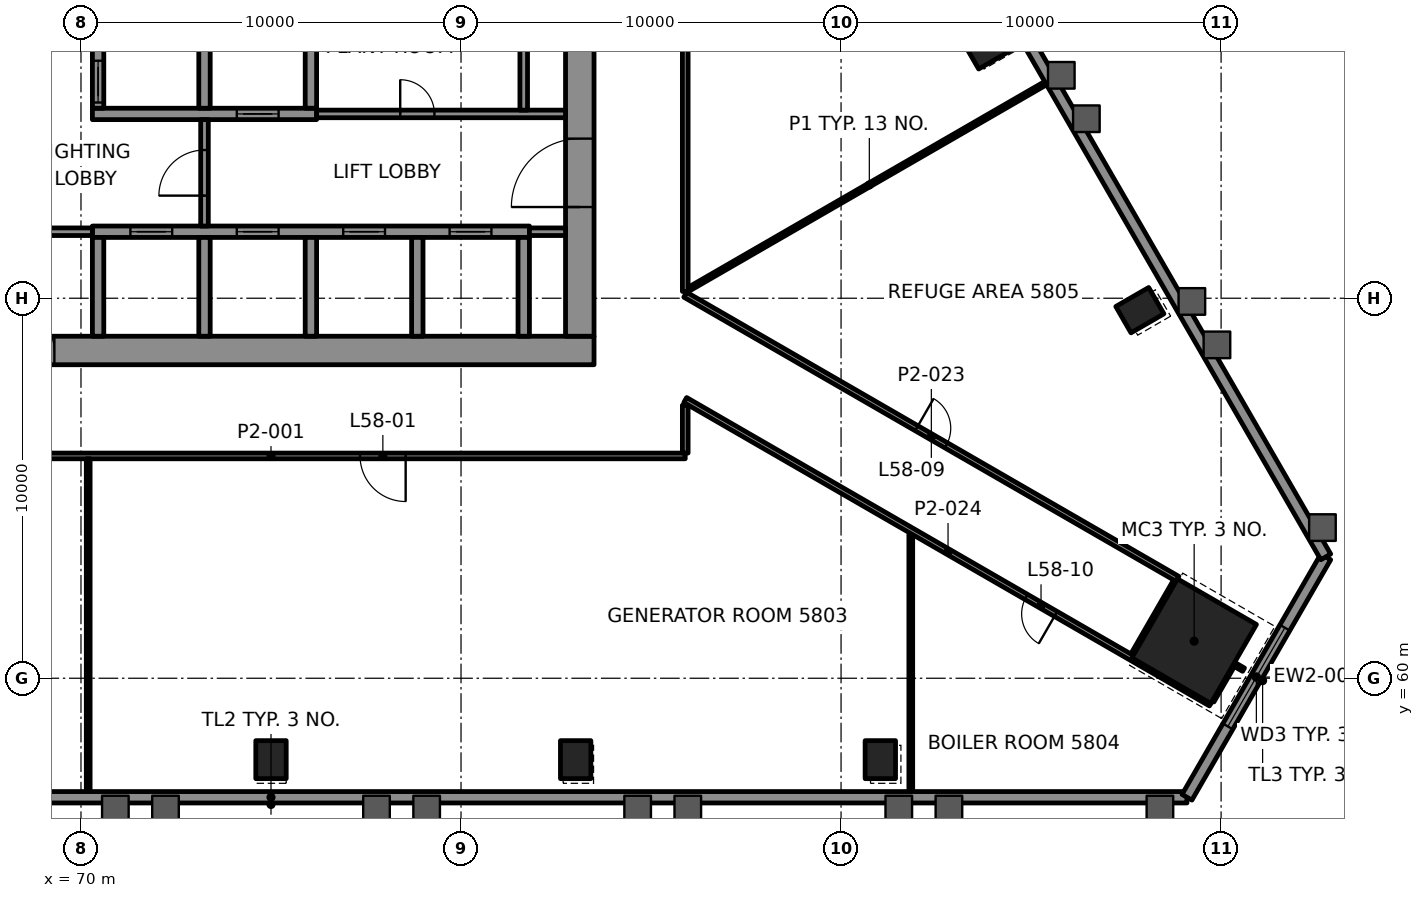
"""IFC4 building model, lengths in metres.
Left out: names, types, materials, properties, quantities, classifications, styles, units other than length and angle.
Written with IfcOpenShell. Run it as: python <this file> out.ifc"""

import sys

from ifc_helpers import new_model, si_unit, direction, frame, frame_2d, origin, origin_2d, place, context, subcontext, project, spatial, rectangle, hollow_rectangle, extrude, element, fill, save


model = new_model("IFC4")
c1 = context("Model", 3, precision=1e-05, world=origin(), true_north=direction((0.0, 1.0)))
c2 = subcontext(c1, "Body", "Model", "MODEL_VIEW")
j1 = project(units=[si_unit("LENGTHUNIT", "METRE"), si_unit("PLANEANGLEUNIT", "RADIAN")], contexts=[c1])
p1 = place(None, origin())
s1 = spatial("IfcSite", under=j1, at=p1, CompositionType="ELEMENT")
p2 = place(p1, origin())
s2 = spatial("IfcBuilding", under=s1, at=p2, CompositionType="ELEMENT")
p3 = place(p2, frame((0.0, 0.0, 247.6)))
s3 = spatial("IfcBuildingStorey", under=s2, at=p3, CompositionType="ELEMENT", Elevation=247.6)
p4 = place(p3, frame((99.291, 60.976, 0.0), z_axis=(0.0, 0.0, 1.0), x_axis=(0.5, 0.866025403784, 0.0)))
e1 = element("IfcColumn", 1, at=p4, inside=s3, PredefinedType="COLUMN", context=c2, shape_type="SweptSolid", body=[
    extrude(rectangle(XDim=2.4, YDim=2.4, at=origin_2d()), origin(), (0.0, 0.0, 1.0), 4.5),
])
for number, where, z_axis, x_axis in (
    (2, (75.0, 57.858, -0.0), (0.0, 0.0, 1.0), (1.0, 0.0, 0.0)),
    (3, (83.017, 57.858, -0.0), (0.0, 0.0, 1.0), (1.0, 0.0, 0.0)),
    (4, (91.033, 57.858, -0.0), (0.0, 0.0, 1.0), (1.0, 0.0, 0.0)),
    (5, (97.862, 69.686, -0.0), (0.0, 0.0, 1.0), (-0.5, 0.866, 0.0)),
    (6, (93.854, 76.628, -0.0), (0.0, 0.0, 1.0), (-0.5, 0.866, 0.0)),
):
    element("IfcColumn", number, at=place(p3, frame(where, z_axis=z_axis, x_axis=x_axis)), inside=s3, PredefinedType="COLUMN", context=c2, shape_type="SweptSolid", body=[
        extrude(hollow_rectangle(XDim=0.8, YDim=1.0, WallThickness=0.05, at=origin_2d()), origin(), (0.0, 0.0, 1.0), 4.5),
    ])
p5 = place(p3, frame((66.5, 68.625, 0.0), z_axis=(0.0, 0.0, 1.0), x_axis=(1.0, 0.0, 0.0)))
e7 = element("IfcWall", 7, at=p5, inside=s3, PredefinedType="SHEAR", context=c2, shape_type="SweptSolid", body=[
    extrude(rectangle(XDim=17.0, YDim=0.75, at=frame_2d((8.5, 0.0))), origin(), (0.0, 0.0, 1.0), 4.05),
])
p6 = place(p5, frame((1.9, 0.0, 0.0)))
e8 = element("IfcOpeningElement", 8, at=p6, cuts=e7, PredefinedType="OPENING", context=c2, shape_type="SweptSolid", body=[
    extrude(rectangle(XDim=0.9, YDim=2.1, at=frame_2d((0.45, 1.05))), frame((0.0, 0.385, 0.0), z_axis=(0.0, -1.0, 0.0), x_axis=(1.0, 0.0, 0.0)), (0.0, 0.0, 1.0), 0.77),
])
p7 = place(p3, frame((83.125, 69.0, 0.0), z_axis=(0.0, 0.0, 1.0), x_axis=(0.0, 1.0, 0.0)))
e9 = element("IfcWall", 9, at=p7, inside=s3, PredefinedType="SHEAR", context=c2, shape_type="SweptSolid", body=[
    extrude(rectangle(XDim=12.0, YDim=0.75, at=frame_2d((6.0, 0.0))), origin(), (0.0, 0.0, 1.0), 4.05),
])
p8 = place(p7, frame((3.4, 0.0, 0.0)))
e10 = element("IfcOpeningElement", 10, at=p8, cuts=e9, PredefinedType="OPENING", context=c2, shape_type="SweptSolid", body=[
    extrude(rectangle(XDim=1.8, YDim=2.1, at=frame_2d((0.9, 1.05))), frame((0.0, 0.385, 0.0), z_axis=(0.0, -1.0, 0.0), x_axis=(1.0, 0.0, 0.0)), (0.0, 0.0, 1.0), 0.77),
])
p9 = place(p3, frame((70.3, 71.75, 0.0), z_axis=(0.0, 0.0, 1.0), x_axis=(1.0, 0.0, 0.0)))
e11 = element("IfcWall", 11, at=p9, inside=s3, PredefinedType="SHEAR", context=c2, shape_type="SweptSolid", body=[
    extrude(rectangle(XDim=11.5, YDim=0.3, at=frame_2d((5.75, 0.0))), origin(), (0.0, 0.0, 1.0), 4.05),
])
p10 = place(p9, frame((1.0, 0.0, 0.0)))
e12 = element("IfcOpeningElement", 12, at=p10, cuts=e11, PredefinedType="OPENING", context=c2, shape_type="SweptSolid", body=[
    extrude(rectangle(XDim=1.1, YDim=2.1, at=frame_2d((0.55, 1.05))), frame((0.0, 0.16, 0.0), z_axis=(0.0, -1.0, 0.0), x_axis=(1.0, 0.0, 0.0)), (0.0, 0.0, 1.0), 0.32),
])
p11 = place(p9, frame((3.8, 0.0, 0.0)))
e13 = element("IfcOpeningElement", 13, at=p11, cuts=e11, PredefinedType="OPENING", context=c2, shape_type="SweptSolid", body=[
    extrude(rectangle(XDim=1.1, YDim=2.1, at=frame_2d((0.55, 1.05))), frame((0.0, 0.16, 0.0), z_axis=(0.0, -1.0, 0.0), x_axis=(1.0, 0.0, 0.0)), (0.0, 0.0, 1.0), 0.32),
])
p12 = place(p9, frame((6.6, 0.0, 0.0)))
e14 = element("IfcOpeningElement", 14, at=p12, cuts=e11, PredefinedType="OPENING", context=c2, shape_type="SweptSolid", body=[
    extrude(rectangle(XDim=1.1, YDim=2.1, at=frame_2d((0.55, 1.05))), frame((0.0, 0.16, 0.0), z_axis=(0.0, -1.0, 0.0), x_axis=(1.0, 0.0, 0.0)), (0.0, 0.0, 1.0), 0.32),
])
p13 = place(p9, frame((9.4, 0.0, 0.0)))
e15 = element("IfcOpeningElement", 15, at=p13, cuts=e11, PredefinedType="OPENING", context=c2, shape_type="SweptSolid", body=[
    extrude(rectangle(XDim=1.1, YDim=2.1, at=frame_2d((0.55, 1.05))), frame((0.0, 0.16, 0.0), z_axis=(0.0, -1.0, 0.0), x_axis=(1.0, 0.0, 0.0)), (0.0, 0.0, 1.0), 0.32),
])
p14 = place(p3, frame((70.3, 74.85, 0.0), z_axis=(0.0, 0.0, 1.0), x_axis=(1.0, 0.0, 0.0)))
e16 = element("IfcWall", 16, at=p14, inside=s3, PredefinedType="SHEAR", context=c2, shape_type="SweptSolid", body=[
    extrude(rectangle(XDim=5.9, YDim=0.3, at=frame_2d((2.95, 0.0))), origin(), (0.0, 0.0, 1.0), 4.05),
])
p15 = place(p14, frame((3.8, 0.0, 0.0)))
e17 = element("IfcOpeningElement", 17, at=p15, cuts=e16, PredefinedType="OPENING", context=c2, shape_type="SweptSolid", body=[
    extrude(rectangle(XDim=1.1, YDim=2.1, at=frame_2d((0.55, 1.05))), frame((0.0, 0.16, 0.0), z_axis=(0.0, -1.0, 0.0), x_axis=(1.0, 0.0, 0.0)), (0.0, 0.0, 1.0), 0.32),
])
p16 = place(p3, frame((70.45, 69.0, 0.0), z_axis=(0.0, 0.0, 1.0), x_axis=(0.0, 1.0, 0.0)))
e18 = element("IfcWall", 18, at=p16, inside=s3, PredefinedType="SHEAR", context=c2, shape_type="SweptSolid", body=[
    extrude(rectangle(XDim=2.6, YDim=0.3, at=frame_2d((1.3, 0.0))), origin(), (0.0, 0.0, 1.0), 4.05),
])
p17 = place(p3, frame((70.45, 75.0, 0.0), z_axis=(0.0, 0.0, 1.0), x_axis=(0.0, 1.0, 0.0)))
e19 = element("IfcWall", 19, at=p17, inside=s3, PredefinedType="SHEAR", context=c2, shape_type="SweptSolid", body=[
    extrude(rectangle(XDim=2.6, YDim=0.3, at=frame_2d((1.3, 0.0))), origin(), (0.0, 0.0, 1.0), 4.05),
])
p18 = place(p17, frame((0.15, 0.0, 0.0)))
e20 = element("IfcOpeningElement", 20, at=p18, cuts=e19, PredefinedType="OPENING", context=c2, shape_type="SweptSolid", body=[
    extrude(rectangle(XDim=1.1, YDim=2.1, at=frame_2d((0.55, 1.05))), frame((0.0, 0.16, 0.0), z_axis=(0.0, -1.0, 0.0), x_axis=(1.0, 0.0, 0.0)), (0.0, 0.0, 1.0), 0.32),
])
for number, where, z_axis, x_axis in (
    (21, (73.25, 69.0, 0.0), (0.0, 0.0, 1.0), (0.0, 1.0, 0.0)),
    (22, (73.25, 75.0, 0.0), (0.0, 0.0, 1.0), (0.0, 1.0, 0.0)),
    (23, (76.05, 69.0, 0.0), (0.0, 0.0, 1.0), (0.0, 1.0, 0.0)),
    (24, (76.05, 75.0, 0.0), (0.0, 0.0, 1.0), (0.0, 1.0, 0.0)),
    (25, (78.85, 69.0, 0.0), (0.0, 0.0, 1.0), (0.0, 1.0, 0.0)),
    (26, (81.65, 69.0, 0.0), (0.0, 0.0, 1.0), (0.0, 1.0, 0.0)),
):
    element("IfcWall", number, at=place(p3, frame(where, z_axis=z_axis, x_axis=x_axis)), inside=s3, PredefinedType="SHEAR", context=c2, shape_type="SweptSolid", body=[
        extrude(rectangle(XDim=2.6, YDim=0.3, at=frame_2d((1.3, 0.0))), origin(), (0.0, 0.0, 1.0), 4.05),
    ])
p19 = place(p3, frame((85.899, 65.85, 0.0), z_axis=(0.0, 0.0, 1.0), x_axis=(-1.0, 0.0, 0.0)))
e27 = element("IfcWall", 27, at=p19, inside=s3, PredefinedType="PARTITIONING", context=c2, shape_type="SweptSolid", body=[
    extrude(rectangle(XDim=21.799, YDim=0.15, at=frame_2d((10.899, 0.0))), origin(), (0.0, 0.0, 1.0), 3.45),
])
p20 = place(p19, frame((7.356, 0.0, 0.0)))
e28 = element("IfcOpeningElement", 28, at=p20, cuts=e27, PredefinedType="OPENING", context=c2, shape_type="SweptSolid", body=[
    extrude(rectangle(XDim=1.2, YDim=2.1, at=frame_2d((0.6, 1.05))), frame((0.0, 0.085, 0.0), z_axis=(0.0, -1.0, 0.0), x_axis=(1.0, 0.0, 0.0)), (0.0, 0.0, 1.0), 0.17),
])
p21 = place(p19, frame((18.053, 0.0, 0.0)))
e29 = element("IfcOpeningElement", 29, at=p21, cuts=e27, PredefinedType="OPENING", context=c2, shape_type="SweptSolid", body=[
    extrude(rectangle(XDim=1.2, YDim=2.1, at=frame_2d((0.6, 1.05))), frame((0.0, 0.085, 0.0), z_axis=(0.0, -1.0, 0.0), x_axis=(1.0, 0.0, 0.0)), (0.0, 0.0, 1.0), 0.17),
])
p22 = place(p3, frame((86.001, 70.243, 0.0), z_axis=(0.0, 0.0, 1.0), x_axis=(0.866028949349, 0.499993858851, 0.0)))
e30 = element("IfcWall", 30, at=p22, inside=s3, PredefinedType="PARTITIONING", context=c2, shape_type="SweptSolid", body=[
    extrude(rectangle(XDim=10.953, YDim=0.1, at=frame_2d((5.477, 0.0))), origin(), (0.0, 0.0, 1.0), 3.372),
])
p23 = place(p3, frame((99.768, 59.402, 0.0), z_axis=(0.0, 0.0, 1.0), x_axis=(0.500017019935, 0.866015577098, 0.0)))
e31 = element("IfcWall", 31, at=p23, inside=s3, PredefinedType="PARTITIONING", context=c2, shape_type="SweptSolid", body=[
    extrude(rectangle(XDim=1.124, YDim=0.1, at=frame_2d((0.562, 0.0))), origin(), (0.0, 0.0, 1.0), 3.45),
])
p24 = place(p3, frame((97.69, 60.602, 0.0), z_axis=(0.0, 0.0, 1.0), x_axis=(0.499991822116, 0.866030125237, 0.0)))
e32 = element("IfcWall", 32, at=p24, inside=s3, PredefinedType="PARTITIONING", context=c2, shape_type="SweptSolid", body=[
    extrude(rectangle(XDim=2.249, YDim=0.15, at=frame_2d((1.125, 0.0))), origin(), (0.0, 0.0, 1.0), 3.297),
])
p25 = place(p3, frame((91.835, 56.898, 0.0), z_axis=(0.0, 0.0, 1.0), x_axis=(0.0, 1.0, 0.0)))
e33 = element("IfcWall", 33, at=p25, inside=s3, PredefinedType="PARTITIONING", context=c2, shape_type="SweptSolid", body=[
    extrude(rectangle(XDim=6.88, YDim=0.1, at=frame_2d((3.44, 0.0))), origin(), (0.0, 0.0, 1.0), 3.45),
])
p26 = place(p3, frame((85.9, 65.926, 0.0), z_axis=(0.0, 0.0, 1.0), x_axis=(0.0, 1.0, 0.0)))
e34 = element("IfcWall", 34, at=p26, inside=s3, PredefinedType="PARTITIONING", context=c2, shape_type="SweptSolid", body=[
    extrude(rectangle(XDim=1.259, YDim=0.15, at=frame_2d((0.629, 0.0))), origin(), (0.0, 0.0, 1.0), 3.297),
])
p27 = place(p3, frame((85.9, 70.179, 0.0), z_axis=(0.0, 0.0, 1.0), x_axis=(0.0, 1.0, 0.0)))
e35 = element("IfcWall", 35, at=p27, inside=s3, PredefinedType="PARTITIONING", context=c2, shape_type="SweptSolid", body=[
    extrude(rectangle(XDim=13.97, YDim=0.15, at=frame_2d((6.985, 0.0))), origin(), (0.0, 0.0, 1.0), 3.45),
])
p28 = place(p3, frame((70.19, 56.898, 0.0), z_axis=(0.0, 0.0, 1.0), x_axis=(0.0, 1.0, 0.0)))
e36 = element("IfcWall", 36, at=p28, inside=s3, PredefinedType="PARTITIONING", context=c2, shape_type="SweptSolid", body=[
    extrude(rectangle(XDim=8.877, YDim=0.1, at=frame_2d((4.438, 0.0))), origin(), (0.0, 0.0, 1.0), 3.372),
])
p29 = place(p3, frame((85.9, 70.093, 0.0), z_axis=(0.0, 0.0, 1.0), x_axis=(0.86602437476, -0.500001782318, 0.0)))
e37 = element("IfcWall", 37, at=p29, inside=s3, PredefinedType="PARTITIONING", context=c2, shape_type="SweptSolid", body=[
    extrude(rectangle(XDim=14.955, YDim=0.15, at=frame_2d((7.478, 0.0))), origin(), (0.0, 0.0, 1.0), 3.45),
])
p30 = place(p29, frame((7.028, 0.0, 0.0)))
e38 = element("IfcOpeningElement", 38, at=p30, cuts=e37, PredefinedType="OPENING", context=c2, shape_type="SweptSolid", body=[
    extrude(rectangle(XDim=0.9, YDim=2.1, at=frame_2d((0.45, 1.05))), frame((0.0, 0.085, 0.0), z_axis=(0.0, -1.0, 0.0), x_axis=(1.0, 0.0, 0.0)), (0.0, 0.0, 1.0), 0.17),
])
p31 = place(p3, frame((100.59, 60.226, 0.0), z_axis=(0.0, 0.0, 1.0), x_axis=(-0.866006330792, 0.500033033937, 0.0)))
e39 = element("IfcWall", 39, at=p31, inside=s3, PredefinedType="PARTITIONING", context=c2, shape_type="SweptSolid", body=[
    extrude(rectangle(XDim=0.25, YDim=0.1, at=frame_2d((0.125, 0.0))), origin(), (0.0, 0.0, 1.0), 3.45),
])
p32 = place(p3, frame((99.73, 59.337, 0.0), z_axis=(0.0, 0.0, 1.0), x_axis=(-0.866026467601, 0.499998157411, 0.0)))
e40 = element("IfcWall", 40, at=p32, inside=s3, PredefinedType="PARTITIONING", context=c2, shape_type="SweptSolid", body=[
    extrude(rectangle(XDim=15.969, YDim=0.15, at=frame_2d((7.985, 0.0))), origin(), (0.0, 0.0, 1.0), 3.297),
])
p33 = place(p32, frame((4.709, 0.0, 0.0)))
e41 = element("IfcOpeningElement", 41, at=p33, cuts=e40, PredefinedType="OPENING", context=c2, shape_type="SweptSolid", body=[
    extrude(rectangle(XDim=0.9, YDim=2.1, at=frame_2d((0.45, 1.05))), frame((0.0, 0.085, 0.0), z_axis=(0.0, -1.0, 0.0), x_axis=(1.0, 0.0, 0.0)), (0.0, 0.0, 1.0), 0.17),
])
p34 = place(p3, frame((50.898, 56.868, 0.0), z_axis=(0.0, 0.0, 1.0), x_axis=(1.0, 0.0, 0.0)))
e42 = element("IfcWall", 42, at=p34, inside=s3, PredefinedType="SOLIDWALL", context=c2, shape_type="SweptSolid", body=[
    extrude(rectangle(XDim=48.204, YDim=0.3, at=frame_2d((24.102, 0.0))), origin(), (0.0, 0.0, 1.0), 4.05),
])
p35 = place(p3, frame((99.102, 56.868, 0.0), z_axis=(0.0, 0.0, 1.0), x_axis=(0.500000231294, 0.866025270247, 0.0)))
e43 = element("IfcWall", 43, at=p35, inside=s3, PredefinedType="SOLIDWALL", context=c2, shape_type="SweptSolid", body=[
    extrude(rectangle(XDim=7.304, YDim=0.3, at=frame_2d((3.652, 0.0))), origin(), (0.0, 0.0, 1.0), 4.05),
])
p36 = place(p35, frame((2.152, 0.0, 0.8)))
e44 = element("IfcOpeningElement", 44, at=p36, cuts=e43, PredefinedType="OPENING", context=c2, shape_type="SweptSolid", body=[
    extrude(rectangle(XDim=3.0, YDim=2.4, at=frame_2d((1.5, 1.2))), frame((0.0, 0.16, 0.0), z_axis=(0.0, -1.0, 0.0), x_axis=(1.0, 0.0, 0.0)), (0.0, 0.0, 1.0), 0.32),
])
for number, where, z_axis, x_axis in (
    (45, (102.754, 63.193, 0.0), (0.0, 0.0, 1.0), (-0.5, 0.866, 0.0)),
    (46, (71.348, 104.939, 0.0), (0.0, 0.0, 1.0), (-0.5, -0.866, 0.0)),
):
    element("IfcWall", number, at=place(p3, frame(where, z_axis=z_axis, x_axis=x_axis)), inside=s3, PredefinedType="SOLIDWALL", context=c2, shape_type="SweptSolid", body=[
        extrude(rectangle(XDim=48.204, YDim=0.3, at=frame_2d((24.102, 0.0))), origin(), (0.0, 0.0, 1.0), 4.05),
    ])
p37 = place(p3, frame((67.25, 71.75, 0.0), z_axis=(0.0, 0.0, 1.0), x_axis=(1.0, 0.0, 0.0)))
e47 = element("IfcWall", 47, at=p37, inside=s3, PredefinedType="PARTITIONING", context=c2, shape_type="SweptSolid", body=[
    extrude(rectangle(XDim=3.05, YDim=0.2, at=frame_2d((1.525, 0.0))), origin(), (0.0, 0.0, 1.0), 4.05),
])
p38 = place(p3, frame((81.8, 71.75, 0.0), z_axis=(0.0, 0.0, 1.0), x_axis=(1.0, 0.0, 0.0)))
e48 = element("IfcWall", 48, at=p38, inside=s3, PredefinedType="PARTITIONING", context=c2, shape_type="SweptSolid", body=[
    extrude(rectangle(XDim=0.95, YDim=0.2, at=frame_2d((0.475, 0.0))), origin(), (0.0, 0.0, 1.0), 4.05),
])
p39 = place(p3, frame((76.2, 74.85, 0.0), z_axis=(0.0, 0.0, 1.0), x_axis=(1.0, 0.0, 0.0)))
e49 = element("IfcWall", 49, at=p39, inside=s3, PredefinedType="PARTITIONING", context=c2, shape_type="SweptSolid", body=[
    extrude(rectangle(XDim=6.55, YDim=0.2, at=frame_2d((3.275, 0.0))), origin(), (0.0, 0.0, 1.0), 4.05),
])
p40 = place(p39, frame((2.2, 0.0, 0.0)))
e50 = element("IfcOpeningElement", 50, at=p40, cuts=e49, PredefinedType="OPENING", context=c2, shape_type="SweptSolid", body=[
    extrude(rectangle(XDim=0.9, YDim=2.1, at=frame_2d((0.45, 1.05))), frame((0.0, 0.11, 0.0), z_axis=(0.0, -1.0, 0.0), x_axis=(1.0, 0.0, 0.0)), (0.0, 0.0, 1.0), 0.22),
])
p41 = place(p3, frame((73.25, 71.9, 0.0), z_axis=(0.0, 0.0, 1.0), x_axis=(0.0, 1.0, 0.0)))
e51 = element("IfcWall", 51, at=p41, inside=s3, PredefinedType="PARTITIONING", context=c2, shape_type="SweptSolid", body=[
    extrude(rectangle(XDim=2.8, YDim=0.2, at=frame_2d((1.4, 0.0))), origin(), (0.0, 0.0, 1.0), 4.05),
])
p42 = place(p41, frame((0.8, 0.0, 0.0)))
e52 = element("IfcOpeningElement", 52, at=p42, cuts=e51, PredefinedType="OPENING", context=c2, shape_type="SweptSolid", body=[
    extrude(rectangle(XDim=1.2, YDim=2.1, at=frame_2d((0.6, 1.05))), frame((0.0, 0.11, 0.0), z_axis=(0.0, -1.0, 0.0), x_axis=(1.0, 0.0, 0.0)), (0.0, 0.0, 1.0), 0.22),
])
p43 = place(p3, frame((81.65, 74.95, 0.0), z_axis=(0.0, 0.0, 1.0), x_axis=(0.0, 1.0, 0.0)))
e53 = element("IfcWall", 53, at=p43, inside=s3, PredefinedType="PARTITIONING", context=c2, shape_type="SweptSolid", body=[
    extrude(rectangle(XDim=2.65, YDim=0.2, at=frame_2d((1.325, 0.0))), origin(), (0.0, 0.0, 1.0), 4.05),
])
p44 = place(p20, origin())
e54 = element("IfcDoor", 54, at=p44, inside=s3, OperationType="DOUBLE_DOOR_SINGLE_SWING", PredefinedType="DOOR", context=c2, shape_type="SweptSolid", body=[
    extrude(rectangle(XDim=1.2, YDim=2.1, at=frame_2d((0.6, 1.05))), frame((0.0, 0.025, 0.0), z_axis=(0.0, -1.0, 0.0), x_axis=(1.0, 0.0, 0.0)), (0.0, 0.0, 1.0), 0.05),
])
fill(e28, e54)
p45 = place(p30, origin())
e55 = element("IfcDoor", 55, at=p45, inside=s3, OperationType="SINGLE_SWING_LEFT", PredefinedType="DOOR", context=c2, shape_type="SweptSolid", body=[
    extrude(rectangle(XDim=0.9, YDim=2.1, at=frame_2d((0.45, 1.05))), frame((0.0, 0.025, 0.0), z_axis=(0.0, -1.0, 0.0), x_axis=(1.0, 0.0, 0.0)), (0.0, 0.0, 1.0), 0.05),
])
fill(e38, e55)
p46 = place(p33, origin())
e56 = element("IfcDoor", 56, at=p46, inside=s3, OperationType="SINGLE_SWING_LEFT", PredefinedType="DOOR", context=c2, shape_type="SweptSolid", body=[
    extrude(rectangle(XDim=0.9, YDim=2.1, at=frame_2d((0.45, 1.05))), frame((0.0, 0.025, 0.0), z_axis=(0.0, -1.0, 0.0), x_axis=(1.0, 0.0, 0.0)), (0.0, 0.0, 1.0), 0.05),
])
fill(e41, e56)
p47 = place(p36, origin())
e57 = element("IfcWindow", 57, at=p47, inside=s3, PartitioningType="SINGLE_PANEL", PredefinedType="WINDOW", context=c2, shape_type="SweptSolid", body=[
    extrude(rectangle(XDim=3.0, YDim=2.4, at=frame_2d((1.5, 1.2))), frame((0.0, 0.03, 0.0), z_axis=(0.0, -1.0, 0.0), x_axis=(1.0, 0.0, 0.0)), (0.0, 0.0, 1.0), 0.06),
])
fill(e44, e57)
p48 = place(p10, origin())
e58 = element("IfcDoor", 58, at=p48, inside=s3, OperationType="DOUBLE_DOOR_SLIDING", PredefinedType="DOOR", context=c2, shape_type="SweptSolid", body=[
    extrude(rectangle(XDim=1.1, YDim=2.1, at=frame_2d((0.55, 1.05))), frame((0.0, 0.025, 0.0), z_axis=(0.0, -1.0, 0.0), x_axis=(1.0, 0.0, 0.0)), (0.0, 0.0, 1.0), 0.05),
])
fill(e12, e58)
p49 = place(p11, origin())
e59 = element("IfcDoor", 59, at=p49, inside=s3, OperationType="DOUBLE_DOOR_SLIDING", PredefinedType="DOOR", context=c2, shape_type="SweptSolid", body=[
    extrude(rectangle(XDim=1.1, YDim=2.1, at=frame_2d((0.55, 1.05))), frame((0.0, 0.025, 0.0), z_axis=(0.0, -1.0, 0.0), x_axis=(1.0, 0.0, 0.0)), (0.0, 0.0, 1.0), 0.05),
])
fill(e13, e59)
p50 = place(p12, origin())
e60 = element("IfcDoor", 60, at=p50, inside=s3, OperationType="DOUBLE_DOOR_SLIDING", PredefinedType="DOOR", context=c2, shape_type="SweptSolid", body=[
    extrude(rectangle(XDim=1.1, YDim=2.1, at=frame_2d((0.55, 1.05))), frame((0.0, 0.025, 0.0), z_axis=(0.0, -1.0, 0.0), x_axis=(1.0, 0.0, 0.0)), (0.0, 0.0, 1.0), 0.05),
])
fill(e14, e60)
p51 = place(p13, origin())
e61 = element("IfcDoor", 61, at=p51, inside=s3, OperationType="DOUBLE_DOOR_SLIDING", PredefinedType="DOOR", context=c2, shape_type="SweptSolid", body=[
    extrude(rectangle(XDim=1.1, YDim=2.1, at=frame_2d((0.55, 1.05))), frame((0.0, 0.025, 0.0), z_axis=(0.0, -1.0, 0.0), x_axis=(1.0, 0.0, 0.0)), (0.0, 0.0, 1.0), 0.05),
])
fill(e15, e61)
p52 = place(p18, origin())
e62 = element("IfcDoor", 62, at=p52, inside=s3, OperationType="DOUBLE_DOOR_SLIDING", PredefinedType="DOOR", context=c2, shape_type="SweptSolid", body=[
    extrude(rectangle(XDim=1.1, YDim=2.1, at=frame_2d((0.55, 1.05))), frame((0.0, 0.025, 0.0), z_axis=(0.0, -1.0, 0.0), x_axis=(1.0, 0.0, 0.0)), (0.0, 0.0, 1.0), 0.05),
])
fill(e20, e62)
p53 = place(p15, origin())
e63 = element("IfcDoor", 63, at=p53, inside=s3, OperationType="DOUBLE_DOOR_SLIDING", PredefinedType="DOOR", context=c2, shape_type="SweptSolid", body=[
    extrude(rectangle(XDim=1.1, YDim=2.1, at=frame_2d((0.55, 1.05))), frame((0.0, 0.025, 0.0), z_axis=(0.0, -1.0, 0.0), x_axis=(1.0, 0.0, 0.0)), (0.0, 0.0, 1.0), 0.05),
])
fill(e17, e63)
p54 = place(p42, origin())
e64 = element("IfcDoor", 64, at=p54, inside=s3, OperationType="SINGLE_SWING_LEFT", PredefinedType="DOOR", context=c2, shape_type="SweptSolid", body=[
    extrude(rectangle(XDim=1.2, YDim=2.1, at=frame_2d((0.6, 1.05))), frame((0.0, 0.025, 0.0), z_axis=(0.0, -1.0, 0.0), x_axis=(1.0, 0.0, 0.0)), (0.0, 0.0, 1.0), 0.05),
])
fill(e52, e64)
p55 = place(p8, origin())
e65 = element("IfcDoor", 65, at=p55, inside=s3, OperationType="SINGLE_SWING_LEFT", PredefinedType="DOOR", context=c2, shape_type="SweptSolid", body=[
    extrude(rectangle(XDim=1.8, YDim=2.1, at=frame_2d((0.9, 1.05))), frame((0.0, 0.095, 0.0), z_axis=(0.0, -1.0, 0.0), x_axis=(1.0, 0.0, 0.0)), (0.0, 0.0, 1.0), 0.19),
])
fill(e10, e65)
p56 = place(p6, origin())
e66 = element("IfcDoor", 66, at=p56, inside=s3, OperationType="SINGLE_SWING_RIGHT", PredefinedType="DOOR", context=c2, shape_type="SweptSolid", body=[
    extrude(rectangle(XDim=0.9, YDim=2.1, at=frame_2d((0.45, 1.05))), frame((0.0, 0.095, 0.0), z_axis=(0.0, -1.0, 0.0), x_axis=(1.0, 0.0, 0.0)), (0.0, 0.0, 1.0), 0.19),
])
fill(e8, e66)
p57 = place(p40, origin())
e67 = element("IfcDoor", 67, at=p57, inside=s3, OperationType="SINGLE_SWING_LEFT", PredefinedType="DOOR", context=c2, shape_type="SweptSolid", body=[
    extrude(rectangle(XDim=0.9, YDim=2.1, at=frame_2d((0.45, 1.05))), frame((0.0, 0.025, 0.0), z_axis=(0.0, -1.0, 0.0), x_axis=(1.0, 0.0, 0.0)), (0.0, 0.0, 1.0), 0.05),
])
fill(e50, e67)
save(model, sys.argv[1])
